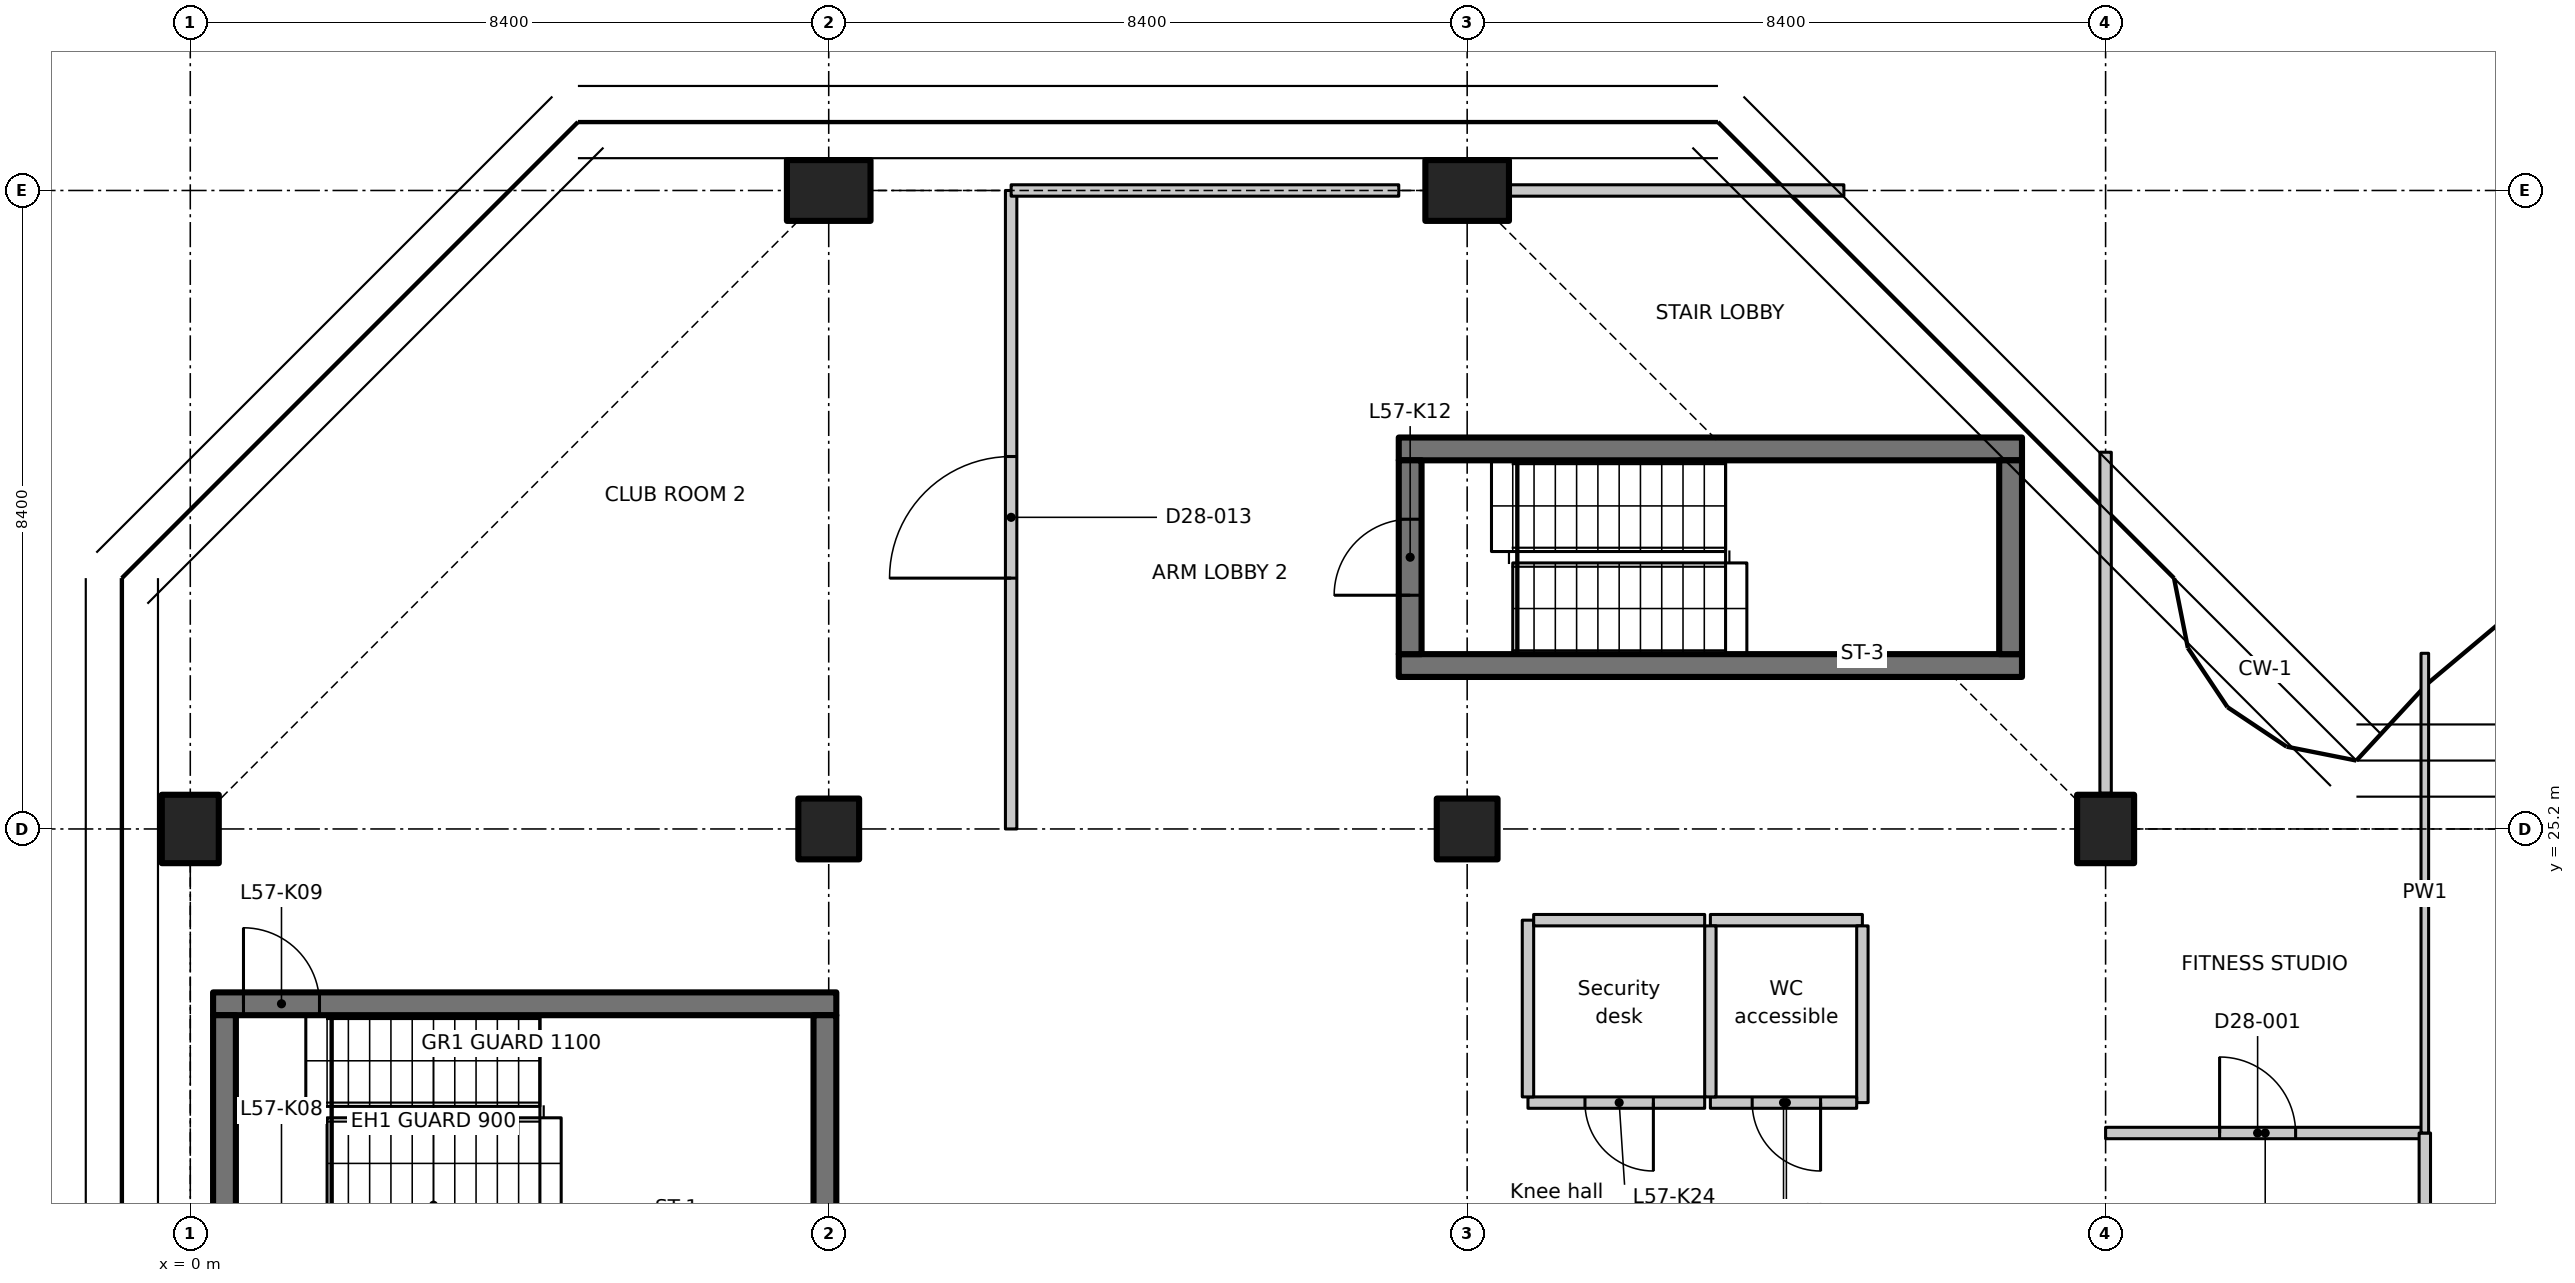
"""IFC4 building model, lengths in metres.
Left out: names, types, materials, properties, quantities, classifications, styles, units other than length and angle.
Written with IfcOpenShell. Run it as: python <this file> out.ifc"""

import sys

from ifc_helpers import new_model, si_unit, direction, frame, frame_2d, origin, origin_2d, place, context, subcontext, project, spatial, polyline, rectangle, outline, extrude, element, fill, save


model = new_model("IFC4")
c1 = context("Model", 3, precision=1e-05, world=origin(), true_north=direction((0.0, 1.0)))
c2 = subcontext(c1, "Body", "Model", "MODEL_VIEW")
j1 = project(units=[si_unit("LENGTHUNIT", "METRE"), si_unit("PLANEANGLEUNIT", "RADIAN")], contexts=[c1])
p1 = place(None, origin())
s1 = spatial("IfcSite", under=j1, at=p1, CompositionType="ELEMENT")
p2 = place(p1, origin())
s2 = spatial("IfcBuilding", under=s1, at=p2, CompositionType="ELEMENT")
p3 = place(p2, frame((0.0, 0.0, 226.5)))
s3 = spatial("IfcBuildingStorey", under=s2, at=p3, CompositionType="ELEMENT", Elevation=226.5)
p4 = place(p3, frame((0.0, 25.2, 0.0), z_axis=(0.0, 0.0, 1.0), x_axis=(1.0, 0.0, 0.0)))
e1 = element("IfcColumn", 1, at=p4, inside=s3, PredefinedType="COLUMN", context=c2, shape_type="SweptSolid", body=[
    extrude(rectangle(XDim=0.75, YDim=0.9, at=origin_2d()), origin(), (0.0, 0.0, 1.0), 3.35),
])
p5 = place(p3, frame((8.4, 25.2, 0.0), z_axis=(0.0, 0.0, 1.0), x_axis=(1.0, 0.0, 0.0)))
e2 = element("IfcColumn", 2, at=p5, inside=s3, PredefinedType="COLUMN", context=c2, shape_type="SweptSolid", body=[
    extrude(rectangle(XDim=0.8, YDim=0.8, at=origin_2d()), origin(), (0.0, 0.0, 1.0), 3.35),
])
p6 = place(p3, frame((8.4, 33.6, 0.0), z_axis=(0.0, 0.0, 1.0), x_axis=(0.0, 1.0, 0.0)))
e3 = element("IfcColumn", 3, at=p6, inside=s3, PredefinedType="COLUMN", context=c2, shape_type="SweptSolid", body=[
    extrude(rectangle(XDim=0.8, YDim=1.1, at=origin_2d()), origin(), (0.0, 0.0, 1.0), 3.35),
])
p7 = place(p3, frame((16.8, 25.2, 0.0), z_axis=(0.0, 0.0, 1.0), x_axis=(1.0, 0.0, 0.0)))
e4 = element("IfcColumn", 4, at=p7, inside=s3, PredefinedType="COLUMN", context=c2, shape_type="SweptSolid", body=[
    extrude(rectangle(XDim=0.8, YDim=0.8, at=origin_2d()), origin(), (0.0, 0.0, 1.0), 3.35),
])
p8 = place(p3, frame((16.8, 33.6, 0.0), z_axis=(0.0, 0.0, 1.0), x_axis=(0.0, 1.0, 0.0)))
e5 = element("IfcColumn", 5, at=p8, inside=s3, PredefinedType="COLUMN", context=c2, shape_type="SweptSolid", body=[
    extrude(rectangle(XDim=0.8, YDim=1.1, at=origin_2d()), origin(), (0.0, 0.0, 1.0), 3.35),
])
p9 = place(p3, frame((25.2, 25.2, 0.0), z_axis=(0.0, 0.0, 1.0), x_axis=(1.0, 0.0, 0.0)))
e6 = element("IfcColumn", 6, at=p9, inside=s3, PredefinedType="COLUMN", context=c2, shape_type="SweptSolid", body=[
    extrude(rectangle(XDim=0.75, YDim=0.9, at=origin_2d()), origin(), (0.0, 0.0, 1.0), 3.35),
])
p10 = place(p3, frame((0.3, 22.9, 0.0), z_axis=(0.0, 0.0, 1.0), x_axis=(1.0, 0.0, 0.0)))
e7 = element("IfcWall", 7, at=p10, inside=s3, PredefinedType="SHEAR", context=c2, shape_type="SweptSolid", body=[
    extrude(rectangle(XDim=8.2, YDim=0.3, at=frame_2d((4.1, 0.0))), origin(), (0.0, 0.0, 1.0), 3.35),
])
p11 = place(p10, frame((0.4, 0.0, 0.0)))
e8 = element("IfcOpeningElement", 8, at=p11, cuts=e7, PredefinedType="OPENING", context=c2, shape_type="SweptSolid", body=[
    extrude(rectangle(XDim=1.0, YDim=2.1, at=frame_2d((0.5, 1.05))), frame((0.0, 0.16, 0.0), z_axis=(0.0, -1.0, 0.0), x_axis=(1.0, 0.0, 0.0)), (0.0, 0.0, 1.0), 0.32),
])
for number, where, z_axis, x_axis in (
    (9, (0.45, 20.2, 0.0), (0.0, 0.0, 1.0), (0.0, 1.0, 0.0)),
    (10, (8.35, 20.2, 0.0), (0.0, 0.0, 1.0), (0.0, 1.0, 0.0)),
):
    element("IfcWall", number, at=place(p3, frame(where, z_axis=z_axis, x_axis=x_axis)), inside=s3, PredefinedType="SHEAR", context=c2, shape_type="SweptSolid", body=[
        extrude(rectangle(XDim=2.55, YDim=0.3, at=frame_2d((1.275, 0.0))), origin(), (0.0, 0.0, 1.0), 3.35),
    ])
for number, where, z_axis, x_axis in (
    (11, (15.9, 27.35, 0.0), (0.0, 0.0, 1.0), (1.0, 0.0, 0.0)),
    (12, (15.9, 30.2, 0.0), (0.0, 0.0, 1.0), (1.0, 0.0, 0.0)),
):
    element("IfcWall", number, at=place(p3, frame(where, z_axis=z_axis, x_axis=x_axis)), inside=s3, PredefinedType="SHEAR", context=c2, shape_type="SweptSolid", body=[
        extrude(rectangle(XDim=8.2, YDim=0.3, at=frame_2d((4.1, 0.0))), origin(), (0.0, 0.0, 1.0), 3.35),
    ])
p12 = place(p3, frame((16.05, 27.5, 0.0), z_axis=(0.0, 0.0, 1.0), x_axis=(0.0, 1.0, 0.0)))
e13 = element("IfcWall", 13, at=p12, inside=s3, PredefinedType="SHEAR", context=c2, shape_type="SweptSolid", body=[
    extrude(rectangle(XDim=2.55, YDim=0.3, at=frame_2d((1.275, 0.0))), origin(), (0.0, 0.0, 1.0), 3.35),
])
p13 = place(p12, frame((0.775, 0.0, 0.0)))
e14 = element("IfcOpeningElement", 14, at=p13, cuts=e13, PredefinedType="OPENING", context=c2, shape_type="SweptSolid", body=[
    extrude(rectangle(XDim=1.0, YDim=2.1, at=frame_2d((0.5, 1.05))), frame((0.0, 0.16, 0.0), z_axis=(0.0, -1.0, 0.0), x_axis=(1.0, 0.0, 0.0)), (0.0, 0.0, 1.0), 0.32),
])
p14 = place(p3, frame((23.95, 27.5, 0.0), z_axis=(0.0, 0.0, 1.0), x_axis=(0.0, 1.0, 0.0)))
e15 = element("IfcWall", 15, at=p14, inside=s3, PredefinedType="SHEAR", context=c2, shape_type="SweptSolid", body=[
    extrude(rectangle(XDim=2.55, YDim=0.3, at=frame_2d((1.275, 0.0))), origin(), (0.0, 0.0, 1.0), 3.35),
])
p15 = place(p3, frame((20.0, 24.0, 0.0), z_axis=(0.0, 0.0, 1.0), x_axis=(1.0, 0.0, 0.0)))
e16 = element("IfcWall", 16, at=p15, inside=s3, PredefinedType="PARTITIONING", context=c2, shape_type="SweptSolid", body=[
    extrude(rectangle(XDim=2.0, YDim=0.15, at=frame_2d((1.0, 0.0))), origin(), (0.0, 0.0, 1.0), 3.35),
])
p16 = place(p3, frame((22.0, 23.925, 0.0), z_axis=(0.0, 0.0, 1.0), x_axis=(0.0, -1.0, 0.0)))
e17 = element("IfcWall", 17, at=p16, inside=s3, PredefinedType="PARTITIONING", context=c2, shape_type="SweptSolid", body=[
    extrude(rectangle(XDim=2.325, YDim=0.15, at=frame_2d((1.163, 0.0))), origin(), (0.0, 0.0, 1.0), 3.35),
])
p17 = place(p3, frame((21.925, 21.6, 0.0), z_axis=(0.0, 0.0, 1.0), x_axis=(-1.0, 0.0, 0.0)))
e18 = element("IfcWall", 18, at=p17, inside=s3, PredefinedType="PARTITIONING", context=c2, shape_type="SweptSolid", body=[
    extrude(rectangle(XDim=1.925, YDim=0.15, at=frame_2d((0.962, 0.0))), origin(), (0.0, 0.0, 1.0), 3.35),
])
p18 = place(p17, frame((0.475, 0.0, 0.0)))
e19 = element("IfcOpeningElement", 19, at=p18, cuts=e18, PredefinedType="OPENING", context=c2, shape_type="SweptSolid", body=[
    extrude(rectangle(XDim=0.9, YDim=2.1, at=frame_2d((0.45, 1.05))), frame((0.0, 0.085, 0.0), z_axis=(0.0, -1.0, 0.0), x_axis=(1.0, 0.0, 0.0)), (0.0, 0.0, 1.0), 0.17),
])
p19 = place(p3, frame((20.0, 21.675, 0.0), z_axis=(0.0, 0.0, 1.0), x_axis=(0.0, 1.0, 0.0)))
e20 = element("IfcWall", 20, at=p19, inside=s3, PredefinedType="PARTITIONING", context=c2, shape_type="SweptSolid", body=[
    extrude(rectangle(XDim=2.25, YDim=0.15, at=frame_2d((1.125, 0.0))), origin(), (0.0, 0.0, 1.0), 3.35),
])
p20 = place(p3, frame((19.925, 21.6, 0.0), z_axis=(0.0, 0.0, 1.0), x_axis=(-1.0, 0.0, 0.0)))
e21 = element("IfcWall", 21, at=p20, inside=s3, PredefinedType="PARTITIONING", context=c2, shape_type="SweptSolid", body=[
    extrude(rectangle(XDim=2.325, YDim=0.15, at=frame_2d((1.163, 0.0))), origin(), (0.0, 0.0, 1.0), 3.35),
])
p21 = place(p20, frame((0.675, 0.0, 0.0)))
e22 = element("IfcOpeningElement", 22, at=p21, cuts=e21, PredefinedType="OPENING", context=c2, shape_type="SweptSolid", body=[
    extrude(rectangle(XDim=0.9, YDim=2.1, at=frame_2d((0.45, 1.05))), frame((0.0, 0.085, 0.0), z_axis=(0.0, -1.0, 0.0), x_axis=(1.0, 0.0, 0.0)), (0.0, 0.0, 1.0), 0.17),
])
p22 = place(p3, frame((17.6, 21.675, 0.0), z_axis=(0.0, 0.0, 1.0), x_axis=(0.0, 1.0, 0.0)))
e23 = element("IfcWall", 23, at=p22, inside=s3, PredefinedType="PARTITIONING", context=c2, shape_type="SweptSolid", body=[
    extrude(rectangle(XDim=2.325, YDim=0.15, at=frame_2d((1.163, 0.0))), origin(), (0.0, 0.0, 1.0), 3.35),
])
p23 = place(p3, frame((17.675, 24.0, 0.0), z_axis=(0.0, 0.0, 1.0), x_axis=(1.0, 0.0, 0.0)))
e24 = element("IfcWall", 24, at=p23, inside=s3, PredefinedType="PARTITIONING", context=c2, shape_type="SweptSolid", body=[
    extrude(rectangle(XDim=2.25, YDim=0.15, at=frame_2d((1.125, 0.0))), origin(), (0.0, 0.0, 1.0), 3.35),
])
p24 = place(p3, frame((25.2, 21.2, 0.0), z_axis=(0.0, 0.0, 1.0), x_axis=(1.0, 0.0, 0.0)))
e25 = element("IfcWall", 25, at=p24, inside=s3, PredefinedType="PARTITIONING", context=c2, shape_type="SweptSolid", body=[
    extrude(rectangle(XDim=4.2, YDim=0.15, at=frame_2d((2.1, 0.0))), origin(), (0.0, 0.0, 1.0), 3.33),
])
p25 = place(p24, frame((1.5, 0.0, 0.0)))
e26 = element("IfcOpeningElement", 26, at=p25, cuts=e25, PredefinedType="OPENING", context=c2, shape_type="SweptSolid", body=[
    extrude(rectangle(XDim=1.0, YDim=2.1, at=frame_2d((0.5, 1.05))), frame((0.0, 0.085, 0.0), z_axis=(0.0, -1.0, 0.0), x_axis=(1.0, 0.0, 0.0)), (0.0, 0.0, 1.0), 0.17),
])
p26 = place(p3, frame((29.4, 21.2, 0.0), z_axis=(0.0, 0.0, 1.0), x_axis=(0.0, -1.0, 0.0)))
e27 = element("IfcWall", 27, at=p26, inside=s3, PredefinedType="PARTITIONING", context=c2, shape_type="SweptSolid", body=[
    extrude(rectangle(XDim=8.2, YDim=0.15, at=frame_2d((4.1, 0.0))), origin(), (0.0, 0.0, 1.0), 3.33),
])
p27 = place(p3, frame((29.4, 27.511, 0.0), z_axis=(0.0, 0.0, 1.0), x_axis=(0.0, -1.0, 0.0)))
e28 = element("IfcWall", 28, at=p27, inside=s3, PredefinedType="PARTITIONING", context=c2, shape_type="SweptSolid", body=[
    extrude(outline(polyline([(0.0, 0.0), (6.311, 0.0), (6.311, 3.33), (2.761, 3.33), (2.759, 2.98), (1.863, 2.98), (1.861, 3.33), (0.236, 3.33), (0.0, 3.33), (0.0, 0.0)])), frame((0.0, 0.05, 0.0), z_axis=(0.0, -1.0, 0.0), x_axis=(1.0, 0.0, 0.0)), (0.0, 0.0, 1.0), 0.1),
])
p28 = place(p3, frame((25.2, 25.67, 0.0), z_axis=(0.0, 0.0, 1.0), x_axis=(0.0, 1.0, 0.0)))
e29 = element("IfcWall", 29, at=p28, inside=s3, PredefinedType="PARTITIONING", context=c2, shape_type="SweptSolid", body=[
    extrude(rectangle(XDim=4.487, YDim=0.15, at=frame_2d((2.243, 0.0))), origin(), (0.0, 0.0, 1.0), 2.98),
])
p29 = place(p3, frame((10.8, 25.2, 0.0), z_axis=(0.0, 0.0, 1.0), x_axis=(0.0, 1.0, 0.0)))
e30 = element("IfcWall", 30, at=p29, inside=s3, PredefinedType="PARTITIONING", context=c2, shape_type="SweptSolid", body=[
    extrude(outline(polyline([(0.0, 0.0), (8.4, 0.0), (8.4, 2.98), (7.952, 2.98), (7.95, 3.33), (0.0, 3.33), (0.0, 0.0)])), frame((0.0, 0.075, 0.0), z_axis=(0.0, -1.0, 0.0), x_axis=(1.0, 0.0, 0.0)), (0.0, 0.0, 1.0), 0.15),
])
p30 = place(p29, frame((3.3, 0.0, 0.0)))
e31 = element("IfcOpeningElement", 31, at=p30, cuts=e30, PredefinedType="OPENING", context=c2, shape_type="SweptSolid", body=[
    extrude(rectangle(XDim=1.6, YDim=2.1, at=frame_2d((0.8, 1.05))), frame((0.0, 0.085, 0.0), z_axis=(0.0, -1.0, 0.0), x_axis=(1.0, 0.0, 0.0)), (0.0, 0.0, 1.0), 0.17),
])
p31 = place(p3, frame((10.8, 33.6, 0.0), z_axis=(0.0, 0.0, 1.0), x_axis=(1.0, 0.0, 0.0)))
e32 = element("IfcWall", 32, at=p31, inside=s3, PredefinedType="PARTITIONING", context=c2, shape_type="SweptSolid", body=[
    extrude(outline(polyline([(0.0, 0.0), (5.1, 0.0), (5.1, 2.98), (0.0, 2.98), (0.0, 0.0)])), frame((0.0, 0.075, 0.0), z_axis=(0.0, -1.0, 0.0), x_axis=(1.0, 0.0, 0.0)), (0.0, 0.0, 1.0), 0.15),
])
p32 = place(p3, frame((17.37, 33.6, 0.0), z_axis=(0.0, 0.0, 1.0), x_axis=(1.0, 0.0, 0.0)))
e33 = element("IfcWall", 33, at=p32, inside=s3, PredefinedType="PARTITIONING", context=c2, shape_type="SweptSolid", body=[
    extrude(rectangle(XDim=4.386, YDim=0.15, at=frame_2d((2.193, 0.0))), origin(), (0.0, 0.0, 1.0), 2.98),
])
p33 = place(p11, origin())
e34 = element("IfcDoor", 34, at=p33, inside=s3, OperationType="SINGLE_SWING_LEFT", PredefinedType="DOOR", context=c2, shape_type="SweptSolid", body=[
    extrude(rectangle(XDim=1.0, YDim=2.1, at=frame_2d((0.5, 1.05))), frame((0.0, 0.025, 0.0), z_axis=(0.0, -1.0, 0.0), x_axis=(1.0, 0.0, 0.0)), (0.0, 0.0, 1.0), 0.05),
])
fill(e8, e34)
p34 = place(p13, origin())
e35 = element("IfcDoor", 35, at=p34, inside=s3, OperationType="SINGLE_SWING_RIGHT", PredefinedType="DOOR", context=c2, shape_type="SweptSolid", body=[
    extrude(rectangle(XDim=1.0, YDim=2.1, at=frame_2d((0.5, 1.05))), frame((0.0, 0.025, 0.0), z_axis=(0.0, -1.0, 0.0), x_axis=(1.0, 0.0, 0.0)), (0.0, 0.0, 1.0), 0.05),
])
fill(e14, e35)
p35 = place(p18, origin())
e36 = element("IfcDoor", 36, at=p35, inside=s3, OperationType="SINGLE_SWING_LEFT", PredefinedType="DOOR", context=c2, shape_type="SweptSolid", body=[
    extrude(rectangle(XDim=0.9, YDim=2.1, at=frame_2d((0.45, 1.05))), frame((0.0, 0.025, 0.0), z_axis=(0.0, -1.0, 0.0), x_axis=(1.0, 0.0, 0.0)), (0.0, 0.0, 1.0), 0.05),
])
fill(e19, e36)
p36 = place(p21, origin())
e37 = element("IfcDoor", 37, at=p36, inside=s3, OperationType="SINGLE_SWING_RIGHT", PredefinedType="DOOR", context=c2, shape_type="SweptSolid", body=[
    extrude(rectangle(XDim=0.9, YDim=2.1, at=frame_2d((0.45, 1.05))), frame((0.0, 0.025, 0.0), z_axis=(0.0, -1.0, 0.0), x_axis=(1.0, 0.0, 0.0)), (0.0, 0.0, 1.0), 0.05),
])
fill(e22, e37)
p37 = place(p25, origin())
e38 = element("IfcDoor", 38, at=p37, inside=s3, OperationType="SINGLE_SWING_LEFT", PredefinedType="DOOR", context=c2, shape_type="SweptSolid", body=[
    extrude(rectangle(XDim=1.0, YDim=2.1, at=frame_2d((0.5, 1.05))), frame((0.0, 0.025, 0.0), z_axis=(0.0, -1.0, 0.0), x_axis=(1.0, 0.0, 0.0)), (0.0, 0.0, 1.0), 0.05),
])
fill(e26, e38)
p38 = place(p30, origin())
e39 = element("IfcDoor", 39, at=p38, inside=s3, OperationType="DOUBLE_DOOR_SINGLE_SWING", PredefinedType="DOOR", context=c2, shape_type="SweptSolid", body=[
    extrude(rectangle(XDim=1.6, YDim=2.1, at=frame_2d((0.8, 1.05))), frame((0.0, 0.025, 0.0), z_axis=(0.0, -1.0, 0.0), x_axis=(1.0, 0.0, 0.0)), (0.0, 0.0, 1.0), 0.05),
])
fill(e31, e39)
save(model, sys.argv[1])
